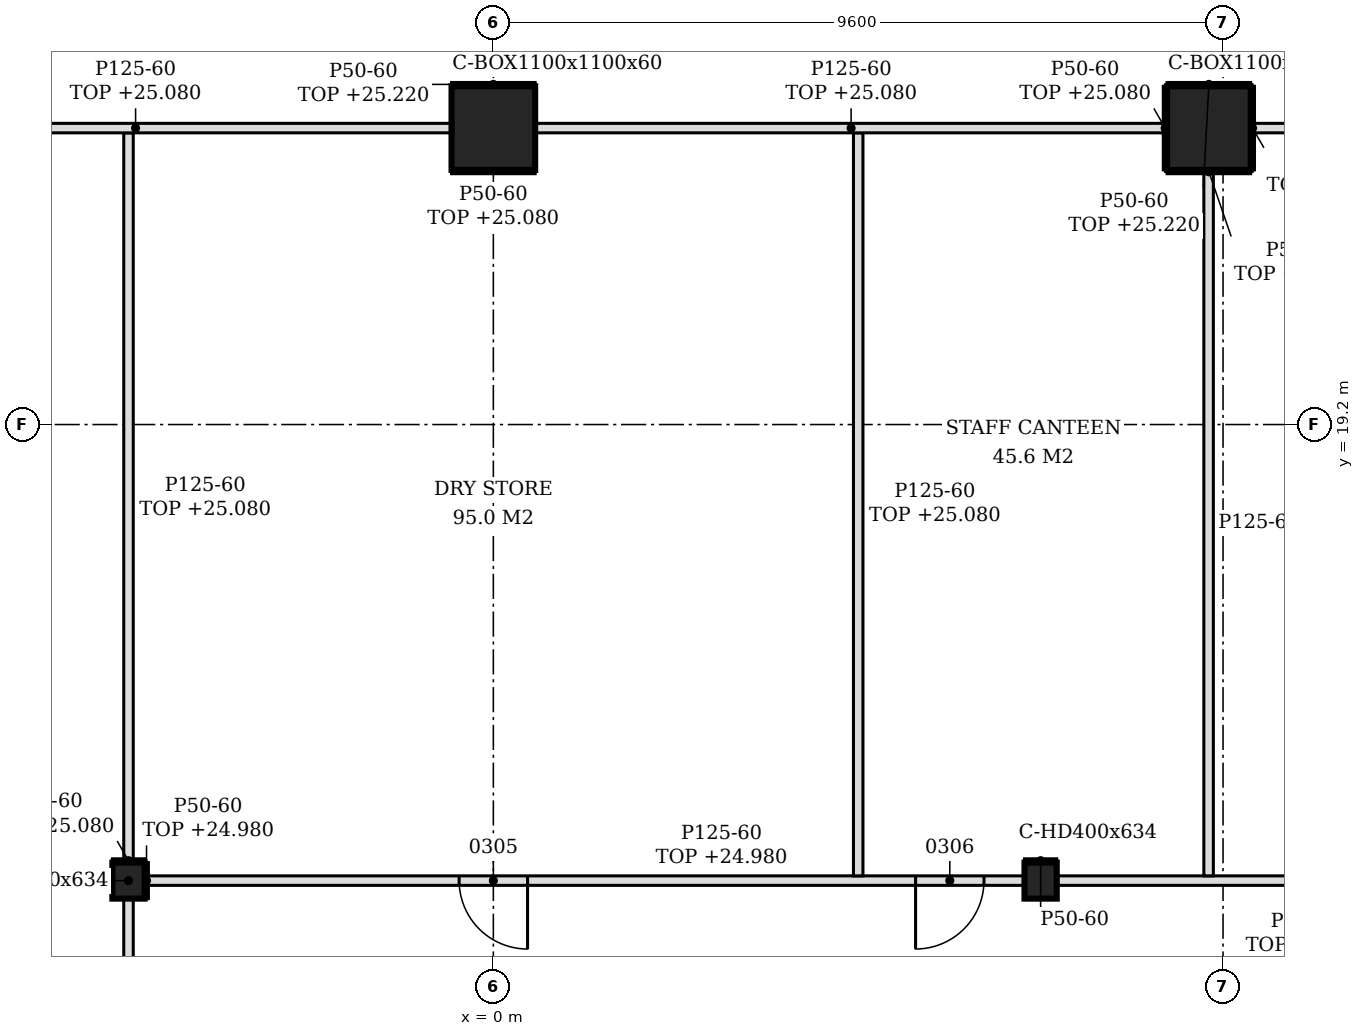
"""IFC4 building model, lengths in metres.
Left out: names, types, materials, properties, quantities, classifications, styles, units other than length and angle.
Written with IfcOpenShell. Run it as: python <this file> out.ifc"""

import sys

from ifc_helpers import new_model, si_unit, direction, frame, frame_2d, origin, origin_2d, place, context, subcontext, project, spatial, polyline, rectangle, hollow_rectangle, i_section, outline, extrude, element, fill, save


model = new_model("IFC4")
c1 = context("Model", 3, precision=1e-05, world=origin(), true_north=direction((0.0, 1.0)))
c2 = subcontext(c1, "Body", "Model", "MODEL_VIEW")
j1 = project(units=[si_unit("LENGTHUNIT", "METRE"), si_unit("PLANEANGLEUNIT", "RADIAN")], contexts=[c1])
p1 = place(None, origin())
s1 = spatial("IfcSite", under=j1, at=p1, CompositionType="ELEMENT")
p2 = place(p1, origin())
s2 = spatial("IfcBuilding", under=s1, at=p2, CompositionType="ELEMENT")
p3 = place(p2, frame((0.0, 0.0, 21.0)))
s3 = spatial("IfcBuildingStorey", under=s2, at=p3, CompositionType="ELEMENT", Elevation=21.0)
for number, where, z_axis, x_axis in (
    (1, (9.414, 23.1, -0.2), (0.0, 0.0, 1.0), (1.0, 0.0, 0.0)),
    (2, (0.0, 23.1, -0.2), (0.0, 0.0, 1.0), (1.0, 0.0, 0.0)),
):
    element("IfcColumn", number, at=place(p3, frame(where, z_axis=z_axis, x_axis=x_axis)), inside=s3, PredefinedType="COLUMN", context=c2, shape_type="SweptSolid", body=[
        extrude(hollow_rectangle(XDim=1.1, YDim=1.1, WallThickness=0.06, at=origin_2d()), origin(), (0.0, 0.0, 1.0), 4.8),
    ])
for number, where, z_axis, x_axis in (
    (3, (-4.8, 13.2, -0.2), (0.0, 0.0, 1.0), (1.0, 0.0, 0.0)),
    (4, (7.2, 13.2, -0.2), (0.0, 0.0, 1.0), (1.0, 0.0, 0.0)),
):
    element("IfcColumn", number, at=place(p3, frame(where, z_axis=z_axis, x_axis=x_axis)), inside=s3, PredefinedType="COLUMN", context=c2, shape_type="SweptSolid", body=[
        extrude(i_section(OverallWidth=0.424, OverallDepth=0.474, WebThickness=0.048, FlangeThickness=0.077, FilletRadius=0.015, at=origin_2d()), origin(), (0.0, 0.0, 1.0), 4.8),
    ])
p4 = place(p3, frame((-4.8, 7.863, 0.0), z_axis=(0.0, 0.0, 1.0), x_axis=(0.0, 1.0, 0.0)))
e5 = element("IfcWall", 5, at=p4, inside=s3, PredefinedType="PARTITIONING", context=c2, shape_type="SweptSolid", body=[
    extrude(rectangle(XDim=5.1, YDim=0.125, at=frame_2d((2.55, 0.0))), origin(), (0.0, 0.0, 1.0), 3.98),
])
p5 = place(p3, frame((-4.588, 13.2, 0.0), z_axis=(0.0, 0.0, 1.0), x_axis=(1.0, 0.0, 0.0)))
e6 = element("IfcWall", 6, at=p5, inside=s3, PredefinedType="PARTITIONING", context=c2, shape_type="SweptSolid", body=[
    extrude(rectangle(XDim=11.576, YDim=0.125, at=frame_2d((5.788, 0.0))), origin(), (0.0, 0.0, 1.0), 3.98),
])
p6 = place(p5, frame((4.138, 0.0, 0.0)))
e7 = element("IfcOpeningElement", 7, at=p6, cuts=e6, PredefinedType="OPENING", context=c2, shape_type="SweptSolid", body=[
    extrude(rectangle(XDim=0.9, YDim=2.1, at=frame_2d((0.45, 1.05))), frame((0.0, 0.073, 0.0), z_axis=(0.0, -1.0, 0.0), x_axis=(1.0, 0.0, 0.0)), (0.0, 0.0, 1.0), 0.145),
])
p7 = place(p5, frame((10.143, 0.0, 0.0)))
e8 = element("IfcOpeningElement", 8, at=p7, cuts=e6, PredefinedType="OPENING", context=c2, shape_type="SweptSolid", body=[
    extrude(rectangle(XDim=0.9, YDim=2.1, at=frame_2d((0.45, 1.05))), frame((0.0, 0.073, 0.0), z_axis=(0.0, -1.0, 0.0), x_axis=(1.0, 0.0, 0.0)), (0.0, 0.0, 1.0), 0.145),
])
p8 = place(p3, frame((7.412, 13.2, 0.0), z_axis=(0.0, 0.0, 1.0), x_axis=(1.0, 0.0, 0.0)))
e9 = element("IfcWall", 9, at=p8, inside=s3, PredefinedType="PARTITIONING", context=c2, shape_type="SweptSolid", body=[
    extrude(rectangle(XDim=11.576, YDim=0.125, at=frame_2d((5.788, 0.0))), origin(), (0.0, 0.0, 1.0), 3.98),
])
p9 = place(p8, frame((5.293, 0.0, 0.0)))
e10 = element("IfcOpeningElement", 10, at=p9, cuts=e9, PredefinedType="OPENING", context=c2, shape_type="SweptSolid", body=[
    extrude(rectangle(XDim=0.8, YDim=2.1, at=frame_2d((0.4, 1.05))), frame((0.0, 0.073, 0.0), z_axis=(0.0, -1.0, 0.0), x_axis=(1.0, 0.0, 0.0)), (0.0, 0.0, 1.0), 0.145),
])
p10 = place(p8, frame((10.138, 0.0, 0.0)))
e11 = element("IfcOpeningElement", 11, at=p10, cuts=e9, PredefinedType="OPENING", context=c2, shape_type="SweptSolid", body=[
    extrude(rectangle(XDim=0.9, YDim=2.1, at=frame_2d((0.45, 1.05))), frame((0.0, 0.073, 0.0), z_axis=(0.0, -1.0, 0.0), x_axis=(1.0, 0.0, 0.0)), (0.0, 0.0, 1.0), 0.145),
])
p11 = place(p3, frame((4.8, 13.262, 0.0), z_axis=(0.0, 0.0, 1.0), x_axis=(0.0, 1.0, 0.0)))
e12 = element("IfcWall", 12, at=p11, inside=s3, PredefinedType="PARTITIONING", context=c2, shape_type="SweptSolid", body=[
    extrude(outline(polyline([(0.0, 0.0), (9.775, 0.0), (9.775, 4.08), (0.087, 4.08), (0.085, 3.98), (0.0, 3.98), (0.0, 0.0)])), frame((0.0, 0.062, 0.0), z_axis=(0.0, -1.0, 0.0), x_axis=(1.0, 0.0, 0.0)), (0.0, 0.0, 1.0), 0.125),
])
p12 = place(p3, frame((9.41, 13.262, 0.0), z_axis=(0.0, 0.0, 1.0), x_axis=(0.0, 1.0, 0.0)))
e13 = element("IfcWall", 13, at=p12, inside=s3, PredefinedType="PARTITIONING", context=c2, shape_type="SweptSolid", body=[
    extrude(outline(polyline([(0.0, 0.0), (9.288, 0.0), (9.288, 4.6), (0.087, 4.6), (0.085, 3.98), (0.0, 3.98), (0.0, 0.0)])), frame((0.0, 0.062, 0.0), z_axis=(0.0, -1.0, 0.0), x_axis=(1.0, 0.0, 0.0)), (0.0, 0.0, 1.0), 0.125),
])
p13 = place(p3, frame((-4.8, 13.437, 0.0), z_axis=(0.0, 0.0, 1.0), x_axis=(0.0, 1.0, 0.0)))
e14 = element("IfcWall", 14, at=p13, inside=s3, PredefinedType="PARTITIONING", context=c2, shape_type="SweptSolid", body=[
    extrude(rectangle(XDim=9.601, YDim=0.125, at=frame_2d((4.8, 0.0))), origin(), (0.0, 0.0, 1.0), 4.08),
])
for number, where, z_axis, x_axis in (
    (15, (-8.864, 23.1, 0.0), (0.0, 0.0, 1.0), (1.0, 0.0, 0.0)),
    (16, (0.55, 23.1, 0.0), (0.0, 0.0, 1.0), (1.0, 0.0, 0.0)),
    (17, (9.964, 23.1, 0.0), (0.0, 0.0, 1.0), (1.0, 0.0, 0.0)),
):
    element("IfcWall", number, at=place(p3, frame(where, z_axis=z_axis, x_axis=x_axis)), inside=s3, PredefinedType="PARTITIONING", context=c2, shape_type="SweptSolid", body=[
        extrude(rectangle(XDim=8.313, YDim=0.125, at=frame_2d((4.157, 0.0))), origin(), (0.0, 0.0, 1.0), 4.08),
    ])
p14 = place(p3, frame((-4.563, 12.963, 0.0), z_axis=(0.0, 0.0, 1.0), x_axis=(0.0, 1.0, 0.0)))
e18 = element("IfcWall", 18, at=p14, inside=s3, PredefinedType="PARTITIONING", context=c2, shape_type="SweptSolid", body=[
    extrude(rectangle(XDim=0.474, YDim=0.05, at=frame_2d((0.237, 0.0))), origin(), (0.0, 0.0, 1.0), 3.98),
])
p15 = place(p3, frame((-5.012, 13.462, 0.0), z_axis=(0.0, 0.0, 1.0), x_axis=(1.0, 0.0, 0.0)))
e19 = element("IfcWall", 19, at=p15, inside=s3, PredefinedType="PARTITIONING", context=c2, shape_type="SweptSolid", body=[
    extrude(rectangle(XDim=0.424, YDim=0.05, at=frame_2d((0.212, 0.0))), origin(), (0.0, 0.0, 1.0), 4.08),
])
p16 = place(p3, frame((6.988, 13.462, 0.0), z_axis=(0.0, 0.0, 1.0), x_axis=(1.0, 0.0, 0.0)))
e20 = element("IfcWall", 20, at=p16, inside=s3, PredefinedType="PARTITIONING", context=c2, shape_type="SweptSolid", body=[
    extrude(rectangle(XDim=0.424, YDim=0.05, at=frame_2d((0.212, 0.0))), origin(), (0.0, 0.0, 1.0), 4.6),
])
for number, where, z_axis, x_axis in (
    (21, (9.989, 22.55, 0.0), (0.0, 0.0, 1.0), (0.0, 1.0, 0.0)),
    (22, (8.839, 22.55, 0.0), (0.0, 0.0, 1.0), (0.0, 1.0, 0.0)),
):
    element("IfcWall", number, at=place(p3, frame(where, z_axis=z_axis, x_axis=x_axis)), inside=s3, PredefinedType="PARTITIONING", context=c2, shape_type="SweptSolid", body=[
        extrude(rectangle(XDim=1.1, YDim=0.05, at=frame_2d((0.55, 0.0))), origin(), (0.0, 0.0, 1.0), 4.08),
    ])
p17 = place(p3, frame((-0.55, 22.525, 0.0), z_axis=(0.0, 0.0, 1.0), x_axis=(1.0, 0.0, 0.0)))
e23 = element("IfcWall", 23, at=p17, inside=s3, PredefinedType="PARTITIONING", context=c2, shape_type="SweptSolid", body=[
    extrude(rectangle(XDim=1.1, YDim=0.05, at=frame_2d((0.55, 0.0))), origin(), (0.0, 0.0, 1.0), 4.08),
])
for number, where, z_axis, x_axis in (
    (24, (-0.55, 23.675, 0.0), (0.0, 0.0, 1.0), (1.0, 0.0, 0.0)),
    (25, (8.864, 23.675, 0.0), (0.0, 0.0, 1.0), (1.0, 0.0, 0.0)),
):
    element("IfcWall", number, at=place(p3, frame(where, z_axis=z_axis, x_axis=x_axis)), inside=s3, PredefinedType="PARTITIONING", context=c2, shape_type="SweptSolid", body=[
        extrude(rectangle(XDim=1.1, YDim=0.05, at=frame_2d((0.55, 0.0))), origin(), (0.0, 0.0, 1.0), 4.22),
    ])
p18 = place(p3, frame((8.864, 22.525, 0.0), z_axis=(0.0, 0.0, 1.0), x_axis=(1.0, 0.0, 0.0)))
e26 = element("IfcWall", 26, at=p18, inside=s3, PredefinedType="PARTITIONING", context=c2, shape_type="SweptSolid", body=[
    extrude(rectangle(XDim=1.1, YDim=0.05, at=frame_2d((0.55, 0.0))), origin(), (0.0, 0.0, 1.0), 4.08),
])
p19 = place(p6, frame((0.9, 0.0, 0.0), z_axis=(0.0, 0.0, 1.0), x_axis=(-1.0, 0.0, 0.0)))
e27 = element("IfcDoor", 27, at=p19, inside=s3, OperationType="SINGLE_SWING_LEFT", PredefinedType="DOOR", context=c2, shape_type="SweptSolid", body=[
    extrude(rectangle(XDim=0.9, YDim=2.1, at=frame_2d((0.45, 1.05))), frame((0.0, 0.025, 0.0), z_axis=(0.0, -1.0, 0.0), x_axis=(1.0, 0.0, 0.0)), (0.0, 0.0, 1.0), 0.05),
])
fill(e7, e27)
p20 = place(p7, frame((0.9, 0.0, 0.0), z_axis=(0.0, 0.0, 1.0), x_axis=(-1.0, 0.0, 0.0)))
e28 = element("IfcDoor", 28, at=p20, inside=s3, OperationType="SINGLE_SWING_RIGHT", PredefinedType="DOOR", context=c2, shape_type="SweptSolid", body=[
    extrude(rectangle(XDim=0.9, YDim=2.1, at=frame_2d((0.45, 1.05))), frame((0.0, 0.025, 0.0), z_axis=(0.0, -1.0, 0.0), x_axis=(1.0, 0.0, 0.0)), (0.0, 0.0, 1.0), 0.05),
])
fill(e8, e28)
save(model, sys.argv[1])
